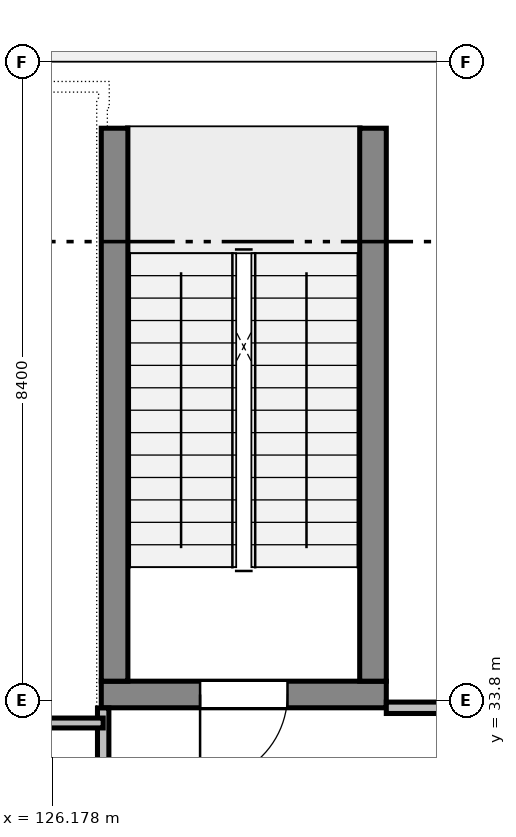
"""IFC4 building model, lengths in metres.
Left out: names, types, materials, properties, quantities, classifications, styles, units other than length and angle.
Written with IfcOpenShell. Run it as: python <this file> out.ifc"""

import sys

from ifc_helpers import new_model, si_unit, direction, frame, frame_2d, origin, place, context, subcontext, project, spatial, rectangle, extrude, element, fill, save


model = new_model("IFC4")
c1 = context("Model", 3, precision=1e-05, world=origin(), true_north=direction((0.0, 1.0)))
c2 = subcontext(c1, "Body", "Model", "MODEL_VIEW")
j1 = project(units=[si_unit("LENGTHUNIT", "METRE"), si_unit("PLANEANGLEUNIT", "RADIAN")], contexts=[c1])
p1 = place(None, origin())
s1 = spatial("IfcSite", under=j1, at=p1, CompositionType="ELEMENT")
p2 = place(p1, origin())
s2 = spatial("IfcBuilding", under=s1, at=p2, CompositionType="ELEMENT")
p3 = place(p2, origin())
s3 = spatial("IfcBuildingStorey", under=s2, at=p3, CompositionType="ELEMENT", Elevation=0.0)
p4 = place(p3, frame((130.575, 33.875, 0.0), z_axis=(0.0, 0.0, 1.0), x_axis=(-1.0, 0.0, 0.0)))
e1 = element("IfcWall", 1, at=p4, inside=s3, PredefinedType="SHEAR", context=c2, shape_type="SweptSolid", body=[
    extrude(rectangle(XDim=3.75, YDim=0.35, at=frame_2d((1.875, 0.0))), origin(), (0.0, 0.0, 1.0), 5.4),
])
p5 = place(p4, frame((1.3, 0.0, 0.0)))
e2 = element("IfcOpeningElement", 2, at=p5, cuts=e1, PredefinedType="OPENING", context=c2, shape_type="SweptSolid", body=[
    extrude(rectangle(XDim=1.15, YDim=2.15, at=frame_2d((0.575, 1.075))), frame((0.0, 0.185, 0.0), z_axis=(0.0, -1.0, 0.0), x_axis=(1.0, 0.0, 0.0)), (0.0, 0.0, 1.0), 0.37),
])
p6 = place(p3, frame((126.825, 41.5, 0.0), z_axis=(0.0, 0.0, 1.0), x_axis=(1.0, 0.0, 0.0)))
e3 = element("IfcWall", 3, at=p6, inside=s3, PredefinedType="SHEAR", context=c2, shape_type="SweptSolid", body=[
    extrude(rectangle(XDim=3.75, YDim=0.35, at=frame_2d((1.875, 0.0))), origin(), (0.0, 0.0, 1.0), 5.4),
])
for number, where, z_axis, x_axis in (
    (4, (127.0, 34.05, 0.0), (0.0, 0.0, 1.0), (0.0, 1.0, 0.0)),
    (5, (130.4, 34.05, 0.0), (0.0, 0.0, 1.0), (0.0, 1.0, 0.0)),
):
    element("IfcWall", number, at=place(p3, frame(where, z_axis=z_axis, x_axis=x_axis)), inside=s3, PredefinedType="SHEAR", context=c2, shape_type="SweptSolid", body=[
        extrude(rectangle(XDim=7.275, YDim=0.35, at=frame_2d((3.637, 0.0))), origin(), (0.0, 0.0, 1.0), 5.4),
    ])
p7 = place(p3, frame((125.6, 42.03, 0.0), z_axis=(0.0, 0.0, 1.0), x_axis=(1.0, 0.0, 0.0)))
e6 = element("IfcWall", 6, at=p7, inside=s3, PredefinedType="STANDARD", context=c2, shape_type="SweptSolid", body=[
    extrude(rectangle(XDim=6.6, YDim=0.34, at=frame_2d((3.3, 0.0))), origin(), (0.0, 0.0, 1.0), 4.535),
])
p8 = place(p7, frame((1.307, 0.0, 0.9)))
e7 = element("IfcOpeningElement", 7, at=p8, cuts=e6, PredefinedType="OPENING", context=c2, shape_type="SweptSolid", body=[
    extrude(rectangle(XDim=0.95, YDim=1.8, at=frame_2d((0.475, 0.9))), frame((0.0, 0.18, 0.0), z_axis=(0.0, -1.0, 0.0), x_axis=(1.0, 0.0, 0.0)), (0.0, 0.0, 1.0), 0.36),
])
p9 = place(p7, frame((4.343, 0.0, 0.9)))
e8 = element("IfcOpeningElement", 8, at=p9, cuts=e6, PredefinedType="OPENING", context=c2, shape_type="SweptSolid", body=[
    extrude(rectangle(XDim=0.95, YDim=1.8, at=frame_2d((0.475, 0.9))), frame((0.0, 0.18, 0.0), z_axis=(0.0, -1.0, 0.0), x_axis=(1.0, 0.0, 0.0)), (0.0, 0.0, 1.0), 0.36),
])
p10 = place(p3, frame((126.85, 30.5, 0.0), z_axis=(0.0, 0.0, 1.0), x_axis=(0.0, 1.0, 0.0)))
e9 = element("IfcWall", 9, at=p10, inside=s3, PredefinedType="PARTITIONING", context=c2, shape_type="SweptSolid", body=[
    extrude(rectangle(XDim=3.198, YDim=0.15, at=frame_2d((1.599, 0.0))), origin(), (0.0, 0.0, 1.0), 4.735),
])
p11 = place(p3, frame((130.575, 33.7, 0.0), z_axis=(0.0, 0.0, 1.0), x_axis=(1.0, 0.0, 0.0)))
e10 = element("IfcWall", 10, at=p11, inside=s3, PredefinedType="PARTITIONING", context=c2, shape_type="SweptSolid", body=[
    extrude(rectangle(XDim=1.275, YDim=0.15, at=frame_2d((0.638, 0.0))), origin(), (0.0, 0.0, 1.0), 4.735),
])
p12 = place(p3, frame((126.85, 33.5, 0.0), z_axis=(0.0, 0.0, 1.0), x_axis=(-1.0, 0.0, 0.0)))
e11 = element("IfcWall", 11, at=p12, inside=s3, PredefinedType="PARTITIONING", context=c2, shape_type="SweptSolid", body=[
    extrude(rectangle(XDim=0.9, YDim=0.13, at=frame_2d((0.45, 0.0))), origin(), (0.0, 0.0, 1.0), 4.535),
])
p13 = place(p8, origin())
e12 = element("IfcWindow", 12, at=p13, inside=s3, PartitioningType="SINGLE_PANEL", PredefinedType="WINDOW", context=c2, shape_type="SweptSolid", body=[
    extrude(rectangle(XDim=0.95, YDim=1.8, at=frame_2d((0.475, 0.9))), frame((0.0, 0.03, 0.0), z_axis=(0.0, -1.0, 0.0), x_axis=(1.0, 0.0, 0.0)), (0.0, 0.0, 1.0), 0.06),
])
fill(e7, e12)
p14 = place(p9, origin())
e13 = element("IfcWindow", 13, at=p14, inside=s3, PartitioningType="SINGLE_PANEL", PredefinedType="WINDOW", context=c2, shape_type="SweptSolid", body=[
    extrude(rectangle(XDim=0.95, YDim=1.8, at=frame_2d((0.475, 0.9))), frame((0.0, 0.03, 0.0), z_axis=(0.0, -1.0, 0.0), x_axis=(1.0, 0.0, 0.0)), (0.0, 0.0, 1.0), 0.06),
])
fill(e8, e13)
p15 = place(p5, origin())
e14 = element("IfcDoor", 14, at=p15, inside=s3, OperationType="SINGLE_SWING_RIGHT", PredefinedType="DOOR", context=c2, shape_type="SweptSolid", body=[
    extrude(rectangle(XDim=1.15, YDim=2.15, at=frame_2d((0.575, 1.075))), frame((0.0, 0.025, 0.0), z_axis=(0.0, -1.0, 0.0), x_axis=(1.0, 0.0, 0.0)), (0.0, 0.0, 1.0), 0.05),
])
fill(e2, e14)
save(model, sys.argv[1])
